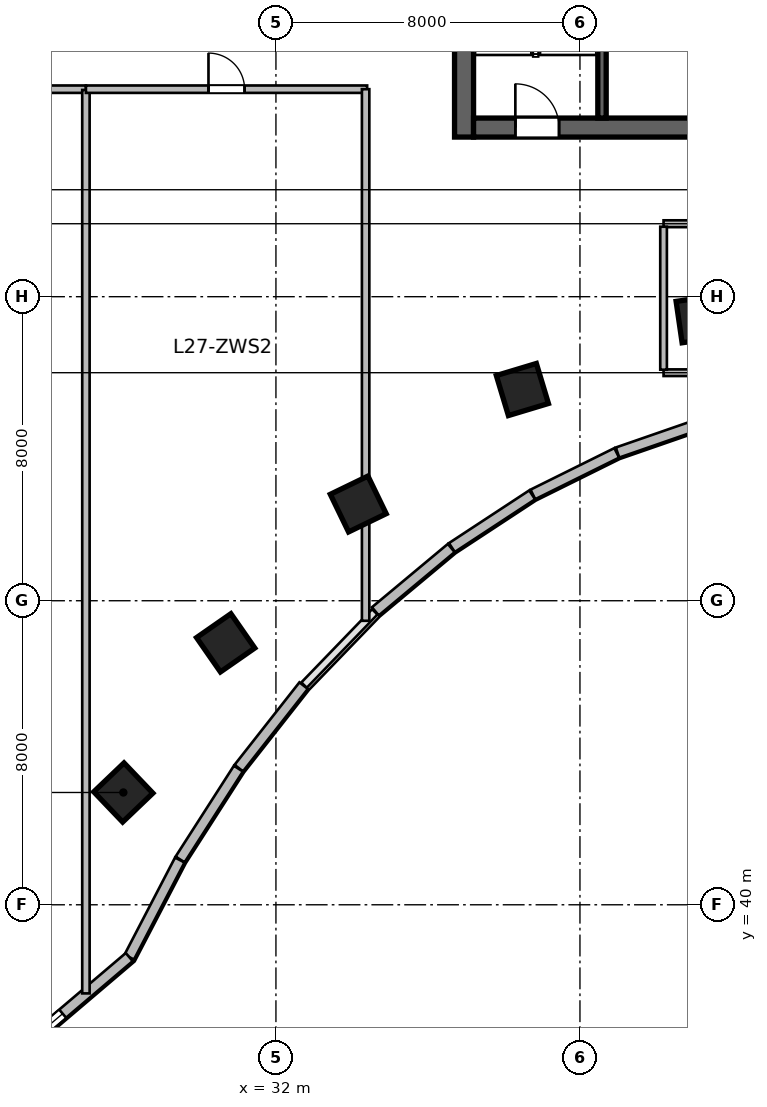
"""IFC4 building model, lengths in metres.
Left out: names, types, materials, properties, quantities, classifications, styles, units other than length and angle.
Written with IfcOpenShell. Run it as: python <this file> out.ifc"""

import sys

from ifc_helpers import new_model, si_unit, direction, frame, frame_2d, origin, origin_2d, place, context, subcontext, project, spatial, rectangle, extrude, source, transform, mapped, element, fill, save


model = new_model("IFC4")
c1 = context("Model", 3, precision=1e-05, world=origin(), true_north=direction((0.0, 1.0)))
c2 = subcontext(c1, "Body", "Model", "MODEL_VIEW")
j1 = project(units=[si_unit("LENGTHUNIT", "METRE"), si_unit("PLANEANGLEUNIT", "RADIAN")], contexts=[c1])
p1 = place(None, origin())
s1 = spatial("IfcSite", under=j1, at=p1, CompositionType="ELEMENT")
p2 = place(p1, origin())
s2 = spatial("IfcBuilding", under=s1, at=p2, CompositionType="ELEMENT")
p3 = place(p2, frame((0.0, 0.0, 115.5)))
s3 = spatial("IfcBuildingStorey", under=s2, at=p3, CompositionType="ELEMENT", Elevation=115.5)
m1 = source(origin(), c2, "Body", "SweptSolid", [
    extrude(rectangle(XDim=12.0, YDim=0.5, at=frame_2d((6.0, 0.0))), origin(), (0.0, 0.0, 1.0), 3.9),
])
p4 = place(p3, frame((36.95, 60.2, 0.0), z_axis=(0.0, 0.0, 1.0), x_axis=(0.0, 1.0, 0.0)))
e1 = element("IfcWall", 1, at=p4, inside=s3, PredefinedType="SHEAR", context=c2, shape_type="MappedRepresentation", body=[
    mapped(m1, transform((0.0, 0.0, 0.0), scale=1.0)),
])
m2 = source(origin(), c2, "Body", "SweptSolid", [
    extrude(rectangle(XDim=21.6, YDim=0.5, at=frame_2d((10.8, 0.0))), origin(), (0.0, 0.0, 1.0), 3.9),
])
p5 = place(p3, frame((37.2, 60.45, 0.0), z_axis=(0.0, 0.0, 1.0), x_axis=(1.0, 0.0, 0.0)))
e2 = element("IfcWall", 2, at=p5, inside=s3, PredefinedType="SHEAR", context=c2, shape_type="MappedRepresentation", body=[
    mapped(m2, transform((0.0, 0.0, 0.0), scale=1.0)),
])
p6 = place(p5, frame((1.1, 0.0, 0.0)))
e3 = element("IfcOpeningElement", 3, at=p6, cuts=e2, PredefinedType="OPENING", context=c2, shape_type="SweptSolid", body=[
    extrude(rectangle(XDim=1.15, YDim=2.15, at=frame_2d((0.575, 1.075))), frame((0.0, 0.26, 0.0), z_axis=(0.0, -1.0, 0.0), x_axis=(1.0, 0.0, 0.0)), (0.0, 0.0, 1.0), 0.52),
])
p7 = place(p5, frame((19.5, 0.0, 0.0)))
e4 = element("IfcOpeningElement", 4, at=p7, cuts=e2, PredefinedType="OPENING", context=c2, shape_type="SweptSolid", body=[
    extrude(rectangle(XDim=0.9, YDim=2.1, at=frame_2d((0.45, 1.05))), frame((0.0, 0.26, 0.0), z_axis=(0.0, -1.0, 0.0), x_axis=(1.0, 0.0, 0.0)), (0.0, 0.0, 1.0), 0.52),
])
p8 = place(p5, frame((12.02, 0.0, 0.0)))
e5 = element("IfcOpeningElement", 5, at=p8, cuts=e2, PredefinedType="OPENING", context=c2, shape_type="SweptSolid", body=[
    extrude(rectangle(XDim=1.6, YDim=2.15, at=frame_2d((0.8, 1.075))), frame((0.0, 0.26, 0.0), z_axis=(0.0, -1.0, 0.0), x_axis=(1.0, 0.0, 0.0)), (0.0, 0.0, 1.0), 0.52),
])
m3 = source(origin(), c2, "Body", "SweptSolid", [
    extrude(rectangle(XDim=11.0, YDim=0.22, at=frame_2d((5.5, 0.0))), origin(), (0.0, 0.0, 1.0), 3.9),
])
p9 = place(p3, frame((40.58, 60.7, 0.0), z_axis=(0.0, 0.0, 1.0), x_axis=(0.0, 1.0, 0.0)))
e6 = element("IfcWall", 6, at=p9, inside=s3, PredefinedType="SHEAR", context=c2, shape_type="MappedRepresentation", body=[
    mapped(m3, transform((0.0, 0.0, 0.0), scale=1.0)),
])
m4 = source(origin(), c2, "Body", "SweptSolid", [
    extrude(rectangle(XDim=1.1, YDim=1.1, at=origin_2d()), origin(), (0.0, 0.0, 1.0), 3.9),
])
for number, where, z_axis, x_axis in (
    (7, (27.985, 42.955, 0.0), (0.0, 0.0, 1.0), (-0.691, 0.723, 0.0)),
    (8, (30.677, 46.892, 0.0), (0.0, 0.0, 1.0), (-0.571, 0.821, 0.0)),
    (9, (34.166, 50.545, 0.0), (0.0, 0.0, 1.0), (-0.436, 0.9, 0.0)),
    (10, (38.485, 53.558, 0.0), (0.0, 0.0, 1.0), (-0.289, 0.957, 0.0)),
    (11, (43.154, 55.411, 0.0), (0.0, 0.0, 1.0), (-0.143, 0.99, 0.0)),
):
    element("IfcColumn", number, at=place(p3, frame(where, z_axis=z_axis, x_axis=x_axis)), inside=s3, PredefinedType="COLUMN", context=c2, shape_type="MappedRepresentation", body=[
        mapped(m4, transform((0.0, 0.0, 0.0), scale=1.0)),
    ])
m5 = source(origin(), c2, "Body", "SweptSolid", [
    extrude(rectangle(XDim=2.411, YDim=0.28, at=frame_2d((1.205, 0.0))), origin(), (0.0, 0.0, 1.0), 3.65),
])
p10 = place(p3, frame((43.266, 52.689, 0.0), z_axis=(0.0, 0.0, 1.0), x_axis=(-0.944880068161, -0.327416640982, 0.0)))
e12 = element("IfcWall", 12, at=p10, inside=s3, PredefinedType="SOLIDWALL", context=c2, shape_type="MappedRepresentation", body=[
    mapped(m5, transform((0.0, 0.0, 0.0), scale=1.0)),
])
m6 = source(origin(), c2, "Body", "SweptSolid", [
    extrude(rectangle(XDim=2.462, YDim=0.28, at=frame_2d((1.231, 0.0))), origin(), (0.0, 0.0, 1.0), 3.65),
])
p11 = place(p3, frame((40.967, 51.891, 0.0), z_axis=(0.0, 0.0, 1.0), x_axis=(-0.8959882207, -0.444077817917, 0.0)))
e13 = element("IfcWall", 13, at=p11, inside=s3, PredefinedType="SOLIDWALL", context=c2, shape_type="MappedRepresentation", body=[
    mapped(m6, transform((0.0, 0.0, 0.0), scale=1.0)),
])
m7 = source(origin(), c2, "Body", "SweptSolid", [
    extrude(rectangle(XDim=2.527, YDim=0.28, at=frame_2d((1.264, 0.0))), origin(), (0.0, 0.0, 1.0), 3.65),
])
p12 = place(p3, frame((38.742, 50.786, 0.0), z_axis=(0.0, 0.0, 1.0), x_axis=(-0.836011905051, -0.548711303523, 0.0)))
e14 = element("IfcWall", 14, at=p12, inside=s3, PredefinedType="SOLIDWALL", context=c2, shape_type="MappedRepresentation", body=[
    mapped(m7, transform((0.0, 0.0, 0.0), scale=1.0)),
])
m8 = source(origin(), c2, "Body", "SweptSolid", [
    extrude(rectangle(XDim=2.601, YDim=0.28, at=frame_2d((1.3, 0.0))), origin(), (0.0, 0.0, 1.0), 3.65),
])
p13 = place(p3, frame((36.613, 49.387, 0.0), z_axis=(0.0, 0.0, 1.0), x_axis=(-0.76796730295, -0.640489048775, 0.0)))
e15 = element("IfcWall", 15, at=p13, inside=s3, PredefinedType="SOLIDWALL", context=c2, shape_type="MappedRepresentation", body=[
    mapped(m8, transform((0.0, 0.0, 0.0), scale=1.0)),
])
m9 = source(origin(), c2, "Body", "SweptSolid", [
    extrude(rectangle(XDim=2.76, YDim=0.28, at=frame_2d((1.38, 0.0))), origin(), (0.0, 0.0, 1.0), 3.65),
])
p14 = place(p3, frame((32.728, 45.766, 0.0), z_axis=(0.0, 0.0, 1.0), x_axis=(-0.618180818641, -0.786035925047, 0.0)))
e16 = element("IfcWall", 16, at=p14, inside=s3, PredefinedType="SOLIDWALL", context=c2, shape_type="MappedRepresentation", body=[
    mapped(m9, transform((0.0, 0.0, 0.0), scale=1.0)),
])
m10 = source(origin(), c2, "Body", "SweptSolid", [
    extrude(rectangle(XDim=2.84, YDim=0.28, at=frame_2d((1.42, 0.0))), origin(), (0.0, 0.0, 1.0), 3.65),
])
p15 = place(p3, frame((31.011, 43.582, 0.0), z_axis=(0.0, 0.0, 1.0), x_axis=(-0.540214368057, -0.841527442538, 0.0)))
e17 = element("IfcWall", 17, at=p15, inside=s3, PredefinedType="SOLIDWALL", context=c2, shape_type="MappedRepresentation", body=[
    mapped(m10, transform((0.0, 0.0, 0.0), scale=1.0)),
])
m11 = source(origin(), c2, "Body", "SweptSolid", [
    extrude(rectangle(XDim=2.88, YDim=0.28, at=frame_2d((1.44, 0.0))), origin(), (0.0, 0.0, 1.0), 3.65),
])
p16 = place(p3, frame((29.469, 41.178, 0.0), z_axis=(0.0, 0.0, 1.0), x_axis=(-0.461769086658, -0.887000175088, 0.0)))
e18 = element("IfcWall", 18, at=p16, inside=s3, PredefinedType="SOLIDWALL", context=c2, shape_type="MappedRepresentation", body=[
    mapped(m11, transform((0.0, 0.0, 0.0), scale=1.0)),
])
m12 = source(origin(), c2, "Body", "SweptSolid", [
    extrude(rectangle(XDim=4.659, YDim=0.28, at=frame_2d((2.33, 0.0))), origin(), (0.0, 0.0, 1.0), 3.65),
])
p17 = place(p3, frame((28.139, 38.624, 0.0), z_axis=(0.0, 0.0, 1.0), x_axis=(-0.761913458795, -0.647678841176, 0.0)))
e19 = element("IfcWall", 19, at=p17, inside=s3, PredefinedType="SOLIDWALL", context=c2, shape_type="MappedRepresentation", body=[
    mapped(m12, transform((0.0, 0.0, 0.0), scale=1.0)),
])
p18 = place(p17, frame((2.299, 0.0, 0.95)))
e20 = element("IfcOpeningElement", 20, at=p18, cuts=e19, PredefinedType="OPENING", context=c2, shape_type="SweptSolid", body=[
    extrude(rectangle(XDim=2.2, YDim=2.1, at=frame_2d((1.1, 1.05))), frame((0.0, 0.15, 0.0), z_axis=(0.0, -1.0, 0.0), x_axis=(1.0, 0.0, 0.0)), (0.0, 0.0, 1.0), 0.3),
])
m13 = source(origin(), c2, "Body", "SweptSolid", [
    extrude(rectangle(XDim=4.176, YDim=0.175, at=frame_2d((2.088, 0.0))), origin(), (0.0, 0.0, 1.0), 3.65),
])
p19 = place(p3, frame((42.2, 54.0, 0.0), z_axis=(0.0, 0.0, 1.0), x_axis=(1.0, 0.0, 0.0)))
e21 = element("IfcWall", 21, at=p19, inside=s3, PredefinedType="PARTITIONING", context=c2, shape_type="MappedRepresentation", body=[
    mapped(m13, transform((0.0, 0.0, 0.0), scale=1.0)),
])
m14 = source(origin(), c2, "Body", "SweptSolid", [
    extrude(rectangle(XDim=4.176, YDim=0.18, at=frame_2d((2.088, 0.0))), origin(), (0.0, 0.0, 1.0), 3.65),
])
p20 = place(p3, frame((42.2, 57.92, 0.0), z_axis=(0.0, 0.0, 1.0), x_axis=(1.0, 0.0, 0.0)))
e22 = element("IfcWall", 22, at=p20, inside=s3, PredefinedType="PLUMBINGWALL", context=c2, shape_type="MappedRepresentation", body=[
    mapped(m14, transform((0.0, 0.0, 0.0), scale=1.0)),
])
p21 = place(p20, frame((1.638, 0.0, 0.0)))
e23 = element("IfcOpeningElement", 23, at=p21, cuts=e22, PredefinedType="OPENING", context=c2, shape_type="SweptSolid", body=[
    extrude(rectangle(XDim=0.9, YDim=2.08, at=frame_2d((0.45, 1.04))), frame((0.0, 0.1, 0.0), z_axis=(0.0, -1.0, 0.0), x_axis=(1.0, 0.0, 0.0)), (0.0, 0.0, 1.0), 0.2),
])
m15 = source(origin(), c2, "Body", "SweptSolid", [
    extrude(rectangle(XDim=3.763, YDim=0.175, at=frame_2d((1.881, 0.0))), origin(), (0.0, 0.0, 1.0), 3.65),
])
p22 = place(p3, frame((42.2, 54.079, 0.0), z_axis=(0.0, 0.0, 1.0), x_axis=(0.0, 1.0, 0.0)))
e24 = element("IfcWall", 24, at=p22, inside=s3, PredefinedType="PARTITIONING", context=c2, shape_type="MappedRepresentation", body=[
    mapped(m15, transform((0.0, 0.0, 0.0), scale=1.0)),
])
m16 = source(origin(), c2, "Body", "SweptSolid", [
    extrude(rectangle(XDim=3.82, YDim=0.195, at=frame_2d((1.91, 0.0))), origin(), (0.0, 0.0, 1.0), 3.65),
])
p23 = place(p3, frame((23.18, 61.46, 0.0), z_axis=(0.0, 0.0, 1.0), x_axis=(1.0, 0.0, 0.0)))
e25 = element("IfcWall", 25, at=p23, inside=s3, PredefinedType="PARTITIONING", context=c2, shape_type="MappedRepresentation", body=[
    mapped(m16, transform((0.0, 0.0, 0.0), scale=1.0)),
])
p24 = place(p23, frame((1.435, 0.0, 0.0)))
e26 = element("IfcOpeningElement", 26, at=p24, cuts=e25, PredefinedType="OPENING", context=c2, shape_type="SweptSolid", body=[
    extrude(rectangle(XDim=0.95, YDim=2.1, at=frame_2d((0.475, 1.05))), frame((0.0, 0.107, 0.0), z_axis=(0.0, -1.0, 0.0), x_axis=(1.0, 0.0, 0.0)), (0.0, 0.0, 1.0), 0.215),
])
m17 = source(origin(), c2, "Body", "SweptSolid", [
    extrude(rectangle(XDim=23.771, YDim=0.195, at=frame_2d((11.886, 0.0))), origin(), (0.0, 0.0, 1.0), 2.942),
])
p25 = place(p3, frame((27.0, 37.668, 0.0), z_axis=(0.0, 0.0, 1.0), x_axis=(0.0, 1.0, 0.0)))
e27 = element("IfcWall", 27, at=p25, inside=s3, PredefinedType="PARTITIONING", context=c2, shape_type="MappedRepresentation", body=[
    mapped(m17, transform((0.0, 0.0, 0.0), scale=1.0)),
])
m18 = source(origin(), c2, "Body", "SweptSolid", [
    extrude(rectangle(XDim=7.4, YDim=0.195, at=frame_2d((3.7, 0.0))), origin(), (0.0, 0.0, 1.0), 3.65),
])
p26 = place(p3, frame((27.0, 61.46, 0.0), z_axis=(0.0, 0.0, 1.0), x_axis=(1.0, 0.0, 0.0)))
e28 = element("IfcWall", 28, at=p26, inside=s3, PredefinedType="PARTITIONING", context=c2, shape_type="MappedRepresentation", body=[
    mapped(m18, transform((0.0, 0.0, 0.0), scale=1.0)),
])
p27 = place(p26, frame((3.225, 0.0, 0.0)))
e29 = element("IfcOpeningElement", 29, at=p27, cuts=e28, PredefinedType="OPENING", context=c2, shape_type="SweptSolid", body=[
    extrude(rectangle(XDim=0.95, YDim=2.1, at=frame_2d((0.475, 1.05))), frame((0.0, 0.107, 0.0), z_axis=(0.0, -1.0, 0.0), x_axis=(1.0, 0.0, 0.0)), (0.0, 0.0, 1.0), 0.215),
])
m19 = source(origin(), c2, "Body", "SweptSolid", [
    extrude(rectangle(XDim=13.988, YDim=0.195, at=frame_2d((6.994, 0.0))), origin(), (0.0, 0.0, 1.0), 3.65),
])
p28 = place(p3, frame((34.36, 47.472, 0.0), z_axis=(0.0, 0.0, 1.0), x_axis=(0.0, 1.0, 0.0)))
e30 = element("IfcWall", 30, at=p28, inside=s3, PredefinedType="PARTITIONING", context=c2, shape_type="MappedRepresentation", body=[
    mapped(m19, transform((0.0, 0.0, 0.0), scale=1.0)),
])
m20 = source(origin(), c2, "Body", "SweptSolid", [
    extrude(rectangle(XDim=2.2, YDim=2.1, at=frame_2d((1.1, 1.05))), frame((0.0, 0.03, 0.0), z_axis=(0.0, -1.0, 0.0), x_axis=(1.0, 0.0, 0.0)), (0.0, 0.0, 1.0), 0.06),
])
p29 = place(p18, origin())
e31 = element("IfcWindow", 31, at=p29, inside=s3, PartitioningType="TRIPLE_PANEL_VERTICAL", PredefinedType="WINDOW", context=c2, shape_type="MappedRepresentation", body=[
    mapped(m20, transform((0.0, 0.0, 0.0), scale=1.0)),
])
fill(e20, e31)
m21 = source(origin(), c2, "Body", "SweptSolid", [
    extrude(rectangle(XDim=1.15, YDim=2.15, at=frame_2d((0.575, 1.075))), frame((0.0, 0.025, 0.0), z_axis=(0.0, -1.0, 0.0), x_axis=(1.0, 0.0, 0.0)), (0.0, 0.0, 1.0), 0.05),
])
p30 = place(p6, origin())
e32 = element("IfcDoor", 32, at=p30, inside=s3, OperationType="SINGLE_SWING_LEFT", PredefinedType="DOOR", context=c2, shape_type="MappedRepresentation", body=[
    mapped(m21, transform((0.0, 0.0, 0.0), scale=1.0)),
])
fill(e3, e32)
m22 = source(origin(), c2, "Body", "SweptSolid", [
    extrude(rectangle(XDim=0.95, YDim=2.1, at=frame_2d((0.475, 1.05))), frame((0.0, 0.025, 0.0), z_axis=(0.0, -1.0, 0.0), x_axis=(1.0, 0.0, 0.0)), (0.0, 0.0, 1.0), 0.05),
])
p31 = place(p27, origin())
e33 = element("IfcDoor", 33, at=p31, inside=s3, OperationType="SINGLE_SWING_LEFT", PredefinedType="DOOR", context=c2, shape_type="MappedRepresentation", body=[
    mapped(m22, transform((0.0, 0.0, 0.0), scale=1.0)),
])
fill(e29, e33)
save(model, sys.argv[1])
